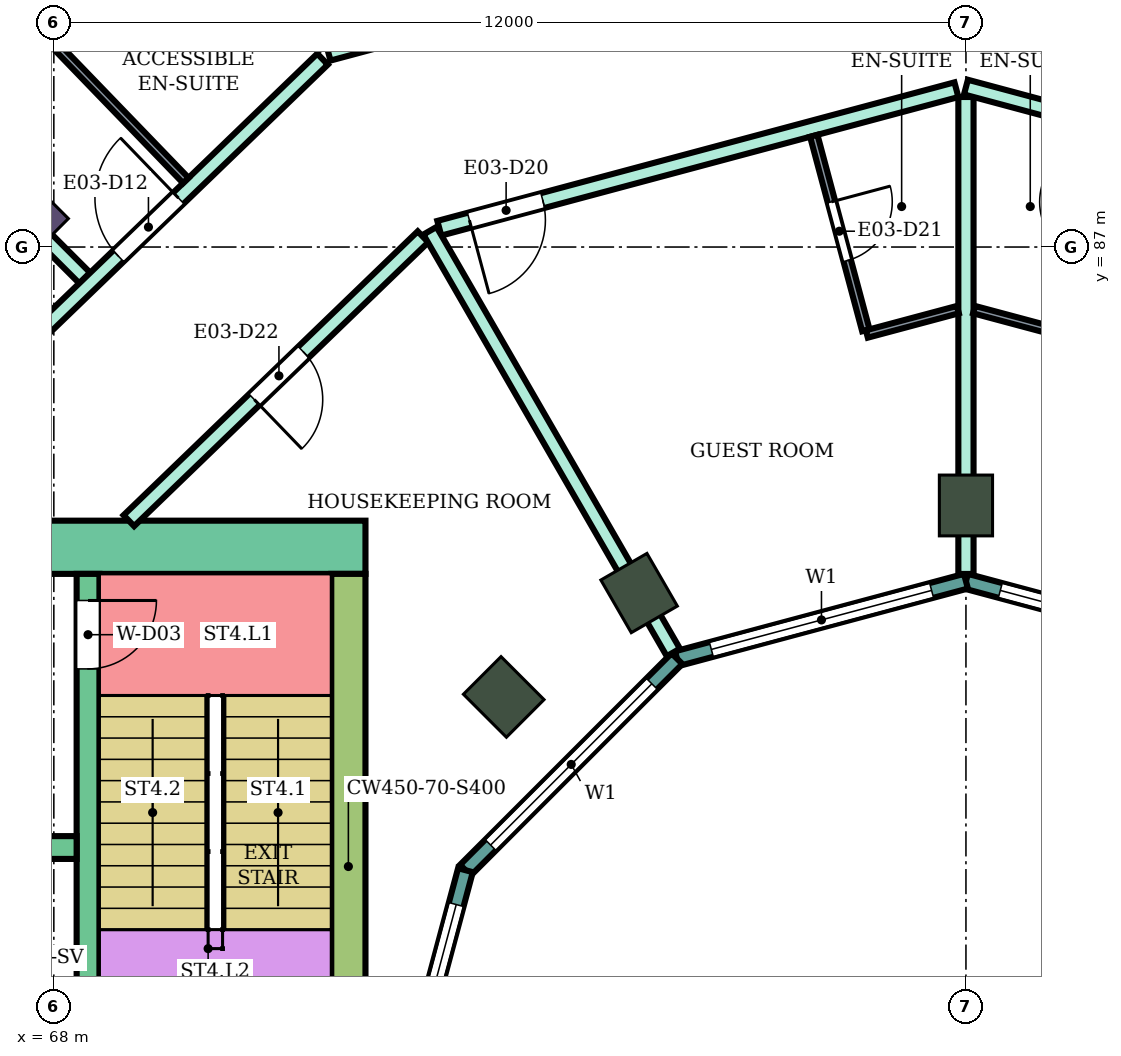
"""IFC4 building model, lengths in metres.
Left out: names, types, materials, properties, quantities, classifications, styles, units other than length and angle.
Written with IfcOpenShell. Run it as: python <this file> out.ifc"""

import sys

from ifc_helpers import new_model, si_unit, direction, frame, frame_2d, origin, origin_2d, place, context, subcontext, project, spatial, rectangle, extrude, element, fill, save


model = new_model("IFC4")
c1 = context("Model", 3, precision=1e-05, world=origin(), true_north=direction((0.0, 1.0)))
c2 = subcontext(c1, "Body", "Model", "MODEL_VIEW")
j1 = project(units=[si_unit("LENGTHUNIT", "METRE"), si_unit("PLANEANGLEUNIT", "RADIAN")], contexts=[c1])
p1 = place(None, origin())
s1 = spatial("IfcSite", under=j1, at=p1, CompositionType="ELEMENT")
p2 = place(p1, origin())
s2 = spatial("IfcBuilding", under=s1, at=p2, CompositionType="ELEMENT")
p3 = place(p2, frame((0.0, 0.0, 145.8)))
s3 = spatial("IfcBuildingStorey", under=s2, at=p3, CompositionType="ELEMENT", Elevation=145.8)
p4 = place(p3, frame((67.555, 87.445, 0.0), z_axis=(0.0, 0.0, 1.0), x_axis=(-0.707106781187, 0.707106781187, 0.0)))
e1 = element("IfcColumn", 1, at=p4, inside=s3, PredefinedType="COLUMN", context=c2, shape_type="SweptSolid", body=[
    extrude(rectangle(XDim=1.0, YDim=0.8, at=origin_2d()), origin(), (0.0, 0.0, 1.0), 3.9),
])
for number, where, z_axis, x_axis in (
    (2, (80.0, 83.6, 0.0), (0.0, 0.0, 1.0), (0.0, 1.0, 0.0)),
    (3, (75.7, 82.448, 0.0), (0.0, 0.0, 1.0), (-0.5, 0.866, 0.0)),
    (4, (73.919, 81.081, 0.0), (0.0, 0.0, 1.0), (-0.707, 0.707, 0.0)),
):
    element("IfcColumn", number, at=place(p3, frame(where, z_axis=z_axis, x_axis=x_axis)), inside=s3, PredefinedType="COLUMN", context=c2, shape_type="SweptSolid", body=[
        extrude(rectangle(XDim=0.8, YDim=0.7, at=origin_2d()), origin(), (0.0, 0.0, 1.0), 3.9),
    ])
p5 = place(p3, frame((72.1, 83.05, 0.0), z_axis=(0.0, 0.0, 1.0), x_axis=(-1.0, 0.0, 0.0)))
e5 = element("IfcWall", 5, at=p5, inside=s3, PredefinedType="SHEAR", context=c2, shape_type="SweptSolid", body=[
    extrude(rectangle(XDim=14.8, YDim=0.7, at=frame_2d((7.4, 0.0))), origin(), (0.0, 0.0, 1.0), 3.5),
])
p6 = place(p5, frame((4.2, 0.0, 0.0)))
e6 = element("IfcOpeningElement", 6, at=p6, cuts=e5, PredefinedType="OPENING", context=c2, shape_type="SweptSolid", body=[
    extrude(rectangle(XDim=2.4, YDim=2.4, at=frame_2d((1.2, 1.2))), frame((0.0, 0.36, 0.0), z_axis=(0.0, -1.0, 0.0), x_axis=(1.0, 0.0, 0.0)), (0.0, 0.0, 1.0), 0.72),
])
p7 = place(p3, frame((71.875, 82.7, 0.0), z_axis=(0.0, 0.0, 1.0), x_axis=(0.0, -1.0, 0.0)))
e7 = element("IfcWall", 7, at=p7, inside=s3, PredefinedType="SHEAR", context=c2, shape_type="SweptSolid", body=[
    extrude(rectangle(XDim=7.7, YDim=0.45, at=frame_2d((3.85, 0.0))), origin(), (0.0, 0.0, 1.0), 3.5),
])
p8 = place(p3, frame((68.45, 82.7, 0.0), z_axis=(0.0, 0.0, 1.0), x_axis=(0.0, -1.0, 0.0)))
e8 = element("IfcWall", 8, at=p8, inside=s3, PredefinedType="SHEAR", context=c2, shape_type="SweptSolid", body=[
    extrude(rectangle(XDim=7.7, YDim=0.3, at=frame_2d((3.85, 0.0))), origin(), (0.0, 0.0, 1.0), 3.5),
])
p9 = place(p8, frame((0.35, 0.0, 0.0)))
e9 = element("IfcOpeningElement", 9, at=p9, cuts=e8, PredefinedType="OPENING", context=c2, shape_type="SweptSolid", body=[
    extrude(rectangle(XDim=0.9, YDim=2.1, at=frame_2d((0.45, 1.05))), frame((0.0, 0.16, 0.0), z_axis=(0.0, -1.0, 0.0), x_axis=(1.0, 0.0, 0.0)), (0.0, 0.0, 1.0), 0.32),
])
p10 = place(p3, frame((68.3, 79.1, 0.0), z_axis=(0.0, 0.0, 1.0), x_axis=(-1.0, 0.0, 0.0)))
e10 = element("IfcWall", 10, at=p10, inside=s3, PredefinedType="SHEAR", context=c2, shape_type="SweptSolid", body=[
    extrude(rectangle(XDim=11.0, YDim=0.3, at=frame_2d((5.5, 0.0))), origin(), (0.0, 0.0, 1.0), 3.5),
])
p11 = place(p10, frame((0.4, 0.0, 0.0)))
e11 = element("IfcOpeningElement", 11, at=p11, cuts=e10, PredefinedType="OPENING", context=c2, shape_type="SweptSolid", body=[
    extrude(rectangle(XDim=1.4, YDim=2.1, at=frame_2d((0.7, 1.05))), frame((0.0, 0.16, 0.0), z_axis=(0.0, -1.0, 0.0), x_axis=(1.0, 0.0, 0.0)), (0.0, 0.0, 1.0), 0.32),
])
p12 = place(p10, frame((5.4, 0.0, 0.0)))
e12 = element("IfcOpeningElement", 12, at=p12, cuts=e10, PredefinedType="OPENING", context=c2, shape_type="SweptSolid", body=[
    extrude(rectangle(XDim=1.4, YDim=2.1, at=frame_2d((0.7, 1.05))), frame((0.0, 0.16, 0.0), z_axis=(0.0, -1.0, 0.0), x_axis=(1.0, 0.0, 0.0)), (0.0, 0.0, 1.0), 0.32),
])
p13 = place(p10, frame((8.1, 0.0, 0.0)))
e13 = element("IfcOpeningElement", 13, at=p13, cuts=e10, PredefinedType="OPENING", context=c2, shape_type="SweptSolid", body=[
    extrude(rectangle(XDim=1.0, YDim=2.1, at=frame_2d((0.5, 1.05))), frame((0.0, 0.16, 0.0), z_axis=(0.0, -1.0, 0.0), x_axis=(1.0, 0.0, 0.0)), (0.0, 0.0, 1.0), 0.32),
])
p14 = place(p3, frame((83.802, 81.585, 0.0), z_axis=(0.0, 0.0, 1.0), x_axis=(-0.965933654434, 0.258789828301, 0.0)))
e14 = element("IfcWall", 14, at=p14, inside=s3, PredefinedType="NOTDEFINED", context=c2, shape_type="SweptSolid", body=[
    extrude(rectangle(XDim=3.936, YDim=0.2, at=frame_2d((1.968, 0.0))), origin(), (0.0, 0.0, 1.0), 3.9),
])
p15 = place(p14, frame((0.468, 0.0, 0.9)))
e15 = element("IfcOpeningElement", 15, at=p15, cuts=e14, PredefinedType="OPENING", context=c2, shape_type="SweptSolid", body=[
    extrude(rectangle(XDim=3.0, YDim=2.3, at=frame_2d((1.5, 1.15))), frame((0.0, 0.11, 0.0), z_axis=(0.0, -1.0, 0.0), x_axis=(1.0, 0.0, 0.0)), (0.0, 0.0, 1.0), 0.22),
])
p16 = place(p3, frame((80.0, 82.604, 0.0), z_axis=(0.0, 0.0, 1.0), x_axis=(-0.965933654434, -0.258789828301, 0.0)))
e16 = element("IfcWall", 16, at=p16, inside=s3, PredefinedType="NOTDEFINED", context=c2, shape_type="SweptSolid", body=[
    extrude(rectangle(XDim=3.936, YDim=0.2, at=frame_2d((1.968, 0.0))), origin(), (0.0, 0.0, 1.0), 3.9),
])
p17 = place(p16, frame((0.468, 0.0, 0.9)))
e17 = element("IfcOpeningElement", 17, at=p17, cuts=e16, PredefinedType="OPENING", context=c2, shape_type="SweptSolid", body=[
    extrude(rectangle(XDim=3.0, YDim=2.3, at=frame_2d((1.5, 1.15))), frame((0.0, 0.11, 0.0), z_axis=(0.0, -1.0, 0.0), x_axis=(1.0, 0.0, 0.0)), (0.0, 0.0, 1.0), 0.22),
])
p18 = place(p3, frame((76.198, 81.585, 0.0), z_axis=(0.0, 0.0, 1.0), x_axis=(-0.707106781187, -0.707106781187, 0.0)))
e18 = element("IfcWall", 18, at=p18, inside=s3, PredefinedType="NOTDEFINED", context=c2, shape_type="SweptSolid", body=[
    extrude(rectangle(XDim=3.936, YDim=0.2, at=frame_2d((1.968, 0.0))), origin(), (0.0, 0.0, 1.0), 3.9),
])
p19 = place(p18, frame((0.468, 0.0, 0.9)))
e19 = element("IfcOpeningElement", 19, at=p19, cuts=e18, PredefinedType="OPENING", context=c2, shape_type="SweptSolid", body=[
    extrude(rectangle(XDim=3.0, YDim=2.3, at=frame_2d((1.5, 1.15))), frame((0.0, 0.11, 0.0), z_axis=(0.0, -1.0, 0.0), x_axis=(1.0, 0.0, 0.0)), (0.0, 0.0, 1.0), 0.22),
])
p20 = place(p3, frame((73.415, 78.802, 0.0), z_axis=(0.0, 0.0, 1.0), x_axis=(-0.258789828301, -0.965933654434, 0.0)))
e20 = element("IfcWall", 20, at=p20, inside=s3, PredefinedType="NOTDEFINED", context=c2, shape_type="SweptSolid", body=[
    extrude(rectangle(XDim=3.936, YDim=0.2, at=frame_2d((1.968, 0.0))), origin(), (0.0, 0.0, 1.0), 3.9),
])
p21 = place(p20, frame((0.468, 0.0, 0.9)))
e21 = element("IfcOpeningElement", 21, at=p21, cuts=e20, PredefinedType="OPENING", context=c2, shape_type="SweptSolid", body=[
    extrude(rectangle(XDim=3.0, YDim=2.3, at=frame_2d((1.5, 1.15))), frame((0.0, 0.11, 0.0), z_axis=(0.0, -1.0, 0.0), x_axis=(1.0, 0.0, 0.0)), (0.0, 0.0, 1.0), 0.22),
])
p22 = place(p3, frame((63.596, 91.406, 0.0), z_axis=(0.0, 0.0, 1.0), x_axis=(0.706963264491, -0.707250268759, 0.0)))
e22 = element("IfcWall", 22, at=p22, inside=s3, PredefinedType="PARTITIONING", context=c2, shape_type="SweptSolid", body=[
    extrude(rectangle(XDim=6.805, YDim=0.2, at=frame_2d((3.403, 0.0))), origin(), (0.0, 0.0, 1.0), 3.45),
])
p23 = place(p3, frame((66.797, 84.9, 0.0), z_axis=(0.0, 0.0, 1.0), x_axis=(0.719692092412, 0.694293376116, 0.0)))
e23 = element("IfcWall", 23, at=p23, inside=s3, PredefinedType="PARTITIONING", context=c2, shape_type="SweptSolid", body=[
    extrude(rectangle(XDim=6.584, YDim=0.2, at=frame_2d((3.292, 0.0))), origin(), (0.0, 0.0, 1.0), 3.45),
])
p24 = place(p23, frame((2.852, 0.0, 0.0)))
e24 = element("IfcOpeningElement", 24, at=p24, cuts=e23, PredefinedType="OPENING", context=c2, shape_type="SweptSolid", body=[
    extrude(rectangle(XDim=1.1, YDim=2.1, at=frame_2d((0.55, 1.05))), frame((0.0, 0.11, 0.0), z_axis=(0.0, -1.0, 0.0), x_axis=(1.0, 0.0, 0.0)), (0.0, 0.0, 1.0), 0.22),
])
p25 = place(p3, frame((68.987, 83.4, 0.0), z_axis=(0.0, 0.0, 1.0), x_axis=(0.719547721855, 0.694442996922, 0.0)))
e25 = element("IfcWall", 25, at=p25, inside=s3, PredefinedType="PARTITIONING", context=c2, shape_type="SweptSolid", body=[
    extrude(rectangle(XDim=5.378, YDim=0.2, at=frame_2d((2.689, 0.0))), origin(), (0.0, 0.0, 1.0), 3.45),
])
p26 = place(p25, frame((2.294, 0.0, 0.0)))
e26 = element("IfcOpeningElement", 26, at=p26, cuts=e25, PredefinedType="OPENING", context=c2, shape_type="SweptSolid", body=[
    extrude(rectangle(XDim=0.9, YDim=2.1, at=frame_2d((0.45, 1.05))), frame((0.0, 0.11, 0.0), z_axis=(0.0, -1.0, 0.0), x_axis=(1.0, 0.0, 0.0)), (0.0, 0.0, 1.0), 0.22),
])
p27 = place(p3, frame((71.614, 89.55, 0.0), z_axis=(0.0, 0.0, 1.0), x_axis=(0.965982156828, 0.258608725086, 0.0)))
e27 = element("IfcWall", 27, at=p27, inside=s3, PredefinedType="PARTITIONING", context=c2, shape_type="SweptSolid", body=[
    extrude(rectangle(XDim=8.592, YDim=0.2, at=frame_2d((4.296, 0.0))), origin(), (0.0, 0.0, 1.0), 3.45),
])
p28 = place(p27, frame((4.865, 0.0, 0.0)))
e28 = element("IfcOpeningElement", 28, at=p28, cuts=e27, PredefinedType="OPENING", context=c2, shape_type="SweptSolid", body=[
    extrude(rectangle(XDim=1.0, YDim=2.1, at=frame_2d((0.5, 1.05))), frame((0.0, 0.11, 0.0), z_axis=(0.0, -1.0, 0.0), x_axis=(1.0, 0.0, 0.0)), (0.0, 0.0, 1.0), 0.22),
])
p29 = place(p27, frame((2.804, 0.0, 0.0)))
e29 = element("IfcOpeningElement", 29, at=p29, cuts=e27, PredefinedType="OPENING", context=c2, shape_type="SweptSolid", body=[
    extrude(rectangle(XDim=1.0, YDim=2.1, at=frame_2d((0.5, 1.05))), frame((0.0, 0.11, 0.0), z_axis=(0.0, -1.0, 0.0), x_axis=(1.0, 0.0, 0.0)), (0.0, 0.0, 1.0), 0.22),
])
p30 = place(p3, frame((73.071, 87.247, 0.0), z_axis=(0.0, 0.0, 1.0), x_axis=(0.965931651205, 0.258797305243, 0.0)))
e30 = element("IfcWall", 30, at=p30, inside=s3, PredefinedType="PARTITIONING", context=c2, shape_type="SweptSolid", body=[
    extrude(rectangle(XDim=7.043, YDim=0.2, at=frame_2d((3.521, 0.0))), origin(), (0.0, 0.0, 1.0), 3.45),
])
p31 = place(p30, frame((0.41, 0.0, 0.0)))
e31 = element("IfcOpeningElement", 31, at=p31, cuts=e30, PredefinedType="OPENING", context=c2, shape_type="SweptSolid", body=[
    extrude(rectangle(XDim=1.0, YDim=2.1, at=frame_2d((0.5, 1.05))), frame((0.0, 0.11, 0.0), z_axis=(0.0, -1.0, 0.0), x_axis=(1.0, 0.0, 0.0)), (0.0, 0.0, 1.0), 0.22),
])
p32 = place(p3, frame((72.948, 87.214, 0.0), z_axis=(0.0, 0.0, 1.0), x_axis=(0.499898430755, -0.866084036875, 0.0)))
e32 = element("IfcWall", 32, at=p32, inside=s3, PredefinedType="PARTITIONING", context=c2, shape_type="SweptSolid", body=[
    extrude(rectangle(XDim=6.405, YDim=0.2, at=frame_2d((3.203, 0.0))), origin(), (0.0, 0.0, 1.0), 3.45),
])
p33 = place(p3, frame((80.0, 82.699, 0.0), z_axis=(0.0, 0.0, 1.0), x_axis=(0.0, 1.0, 0.0)))
e33 = element("IfcWall", 33, at=p33, inside=s3, PredefinedType="PARTITIONING", context=c2, shape_type="SweptSolid", body=[
    extrude(rectangle(XDim=6.275, YDim=0.2, at=frame_2d((3.138, 0.0))), origin(), (0.0, 0.0, 1.0), 3.45),
])
p34 = place(p3, frame((80.0, 89.104, 0.0), z_axis=(0.0, 0.0, 1.0), x_axis=(0.965854247166, -0.25908603442, 0.0)))
e34 = element("IfcWall", 34, at=p34, inside=s3, PredefinedType="PARTITIONING", context=c2, shape_type="SweptSolid", body=[
    extrude(rectangle(XDim=7.183, YDim=0.2, at=frame_2d((3.592, 0.0))), origin(), (0.0, 0.0, 1.0), 3.45),
])
p35 = place(p34, frame((5.763, 0.0, 0.0)))
e35 = element("IfcOpeningElement", 35, at=p35, cuts=e34, PredefinedType="OPENING", context=c2, shape_type="SweptSolid", body=[
    extrude(rectangle(XDim=1.0, YDim=2.1, at=frame_2d((0.5, 1.05))), frame((0.0, 0.11, 0.0), z_axis=(0.0, -1.0, 0.0), x_axis=(1.0, 0.0, 0.0)), (0.0, 0.0, 1.0), 0.22),
])
p36 = place(p3, frame((80.0, 91.796, 0.0), z_axis=(0.0, 0.0, 1.0), x_axis=(0.965891796243, -0.258946013582, 0.0)))
e36 = element("IfcWall", 36, at=p36, inside=s3, PredefinedType="PARTITIONING", context=c2, shape_type="SweptSolid", body=[
    extrude(rectangle(XDim=8.642, YDim=0.2, at=frame_2d((4.321, 0.0))), origin(), (0.0, 0.0, 1.0), 3.45),
])
p37 = place(p36, frame((4.877, 0.0, 0.0)))
e37 = element("IfcOpeningElement", 37, at=p37, cuts=e36, PredefinedType="OPENING", context=c2, shape_type="SweptSolid", body=[
    extrude(rectangle(XDim=1.0, YDim=2.1, at=frame_2d((0.5, 1.05))), frame((0.0, 0.11, 0.0), z_axis=(0.0, -1.0, 0.0), x_axis=(1.0, 0.0, 0.0)), (0.0, 0.0, 1.0), 0.22),
])
p38 = place(p36, frame((2.817, 0.0, 0.0)))
e38 = element("IfcOpeningElement", 38, at=p38, cuts=e36, PredefinedType="OPENING", context=c2, shape_type="SweptSolid", body=[
    extrude(rectangle(XDim=1.0, YDim=2.1, at=frame_2d((0.5, 1.05))), frame((0.0, 0.11, 0.0), z_axis=(0.0, -1.0, 0.0), x_axis=(1.0, 0.0, 0.0)), (0.0, 0.0, 1.0), 0.22),
])
p39 = place(p3, frame((67.758, 89.926, 0.0), z_axis=(0.0, 0.0, 1.0), x_axis=(0.694485934895, -0.719506279495, 0.0)))
e39 = element("IfcWall", 39, at=p39, inside=s3, PredefinedType="PARTITIONING", context=c2, shape_type="SweptSolid", body=[
    extrude(rectangle(XDim=2.849, YDim=0.1, at=frame_2d((1.425, 0.0))), origin(), (0.0, 0.0, 1.0), 3.45),
])
p40 = place(p3, frame((77.998, 88.463, 0.0), z_axis=(0.0, 0.0, 1.0), x_axis=(0.258677737588, -0.965963678446, 0.0)))
e40 = element("IfcWall", 40, at=p40, inside=s3, PredefinedType="PARTITIONING", context=c2, shape_type="SweptSolid", body=[
    extrude(rectangle(XDim=2.649, YDim=0.1, at=frame_2d((1.325, 0.0))), origin(), (0.0, 0.0, 1.0), 3.45),
])
p41 = place(p40, frame((0.9, 0.0, 0.0)))
e41 = element("IfcOpeningElement", 41, at=p41, cuts=e40, PredefinedType="OPENING", context=c2, shape_type="SweptSolid", body=[
    extrude(rectangle(XDim=0.8, YDim=2.1, at=frame_2d((0.4, 1.05))), frame((0.0, 0.06, 0.0), z_axis=(0.0, -1.0, 0.0), x_axis=(1.0, 0.0, 0.0)), (0.0, 0.0, 1.0), 0.12),
])
p42 = place(p3, frame((78.696, 85.856, 0.0), z_axis=(0.0, 0.0, 1.0), x_axis=(0.966002513606, 0.258532674351, 0.0)))
e42 = element("IfcWall", 42, at=p42, inside=s3, PredefinedType="PARTITIONING", context=c2, shape_type="SweptSolid", body=[
    extrude(rectangle(XDim=1.24, YDim=0.1, at=frame_2d((0.62, 0.0))), origin(), (0.0, 0.0, 1.0), 3.45),
])
p43 = place(p3, frame((80.106, 86.177, 0.0), z_axis=(0.0, 0.0, 1.0), x_axis=(0.966002973184, -0.258530957139, 0.0)))
e43 = element("IfcWall", 43, at=p43, inside=s3, PredefinedType="PARTITIONING", context=c2, shape_type="SweptSolid", body=[
    extrude(rectangle(XDim=1.19, YDim=0.1, at=frame_2d((0.595, 0.0))), origin(), (0.0, 0.0, 1.0), 3.45),
])
p44 = place(p15, origin())
e44 = element("IfcWindow", 44, at=p44, inside=s3, PartitioningType="SINGLE_PANEL", PredefinedType="WINDOW", context=c2, shape_type="SweptSolid", body=[
    extrude(rectangle(XDim=3.0, YDim=2.3, at=frame_2d((1.5, 1.15))), frame((0.0, 0.03, 0.0), z_axis=(0.0, -1.0, 0.0), x_axis=(1.0, 0.0, 0.0)), (0.0, 0.0, 1.0), 0.06),
])
fill(e15, e44)
p45 = place(p17, origin())
e45 = element("IfcWindow", 45, at=p45, inside=s3, PartitioningType="SINGLE_PANEL", PredefinedType="WINDOW", context=c2, shape_type="SweptSolid", body=[
    extrude(rectangle(XDim=3.0, YDim=2.3, at=frame_2d((1.5, 1.15))), frame((0.0, 0.03, 0.0), z_axis=(0.0, -1.0, 0.0), x_axis=(1.0, 0.0, 0.0)), (0.0, 0.0, 1.0), 0.06),
])
fill(e17, e45)
p46 = place(p19, origin())
e46 = element("IfcWindow", 46, at=p46, inside=s3, PartitioningType="SINGLE_PANEL", PredefinedType="WINDOW", context=c2, shape_type="SweptSolid", body=[
    extrude(rectangle(XDim=3.0, YDim=2.3, at=frame_2d((1.5, 1.15))), frame((0.0, 0.03, 0.0), z_axis=(0.0, -1.0, 0.0), x_axis=(1.0, 0.0, 0.0)), (0.0, 0.0, 1.0), 0.06),
])
fill(e19, e46)
p47 = place(p21, origin())
e47 = element("IfcWindow", 47, at=p47, inside=s3, PartitioningType="SINGLE_PANEL", PredefinedType="WINDOW", context=c2, shape_type="SweptSolid", body=[
    extrude(rectangle(XDim=3.0, YDim=2.3, at=frame_2d((1.5, 1.15))), frame((0.0, 0.03, 0.0), z_axis=(0.0, -1.0, 0.0), x_axis=(1.0, 0.0, 0.0)), (0.0, 0.0, 1.0), 0.06),
])
fill(e21, e47)
p48 = place(p24, origin())
e48 = element("IfcDoor", 48, at=p48, inside=s3, OperationType="SINGLE_SWING_RIGHT", PredefinedType="DOOR", context=c2, shape_type="SweptSolid", body=[
    extrude(rectangle(XDim=1.1, YDim=2.1, at=frame_2d((0.55, 1.05))), frame((0.0, 0.025, 0.0), z_axis=(0.0, -1.0, 0.0), x_axis=(1.0, 0.0, 0.0)), (0.0, 0.0, 1.0), 0.05),
])
fill(e24, e48)
p49 = place(p31, frame((1.0, 0.0, 0.0), z_axis=(0.0, 0.0, 1.0), x_axis=(-1.0, 0.0, 0.0)))
e49 = element("IfcDoor", 49, at=p49, inside=s3, OperationType="SINGLE_SWING_RIGHT", PredefinedType="DOOR", context=c2, shape_type="SweptSolid", body=[
    extrude(rectangle(XDim=1.0, YDim=2.1, at=frame_2d((0.5, 1.05))), frame((0.0, 0.025, 0.0), z_axis=(0.0, -1.0, 0.0), x_axis=(1.0, 0.0, 0.0)), (0.0, 0.0, 1.0), 0.05),
])
fill(e31, e49)
p50 = place(p41, origin())
e50 = element("IfcDoor", 50, at=p50, inside=s3, OperationType="SINGLE_SWING_LEFT", PredefinedType="DOOR", context=c2, shape_type="SweptSolid", body=[
    extrude(rectangle(XDim=0.8, YDim=2.1, at=frame_2d((0.4, 1.05))), frame((0.0, 0.025, 0.0), z_axis=(0.0, -1.0, 0.0), x_axis=(1.0, 0.0, 0.0)), (0.0, 0.0, 1.0), 0.05),
])
fill(e41, e50)
p51 = place(p26, frame((0.9, 0.0, 0.0), z_axis=(0.0, 0.0, 1.0), x_axis=(-1.0, 0.0, 0.0)))
e51 = element("IfcDoor", 51, at=p51, inside=s3, OperationType="SINGLE_SWING_RIGHT", PredefinedType="DOOR", context=c2, shape_type="SweptSolid", body=[
    extrude(rectangle(XDim=0.9, YDim=2.1, at=frame_2d((0.45, 1.05))), frame((0.0, 0.025, 0.0), z_axis=(0.0, -1.0, 0.0), x_axis=(1.0, 0.0, 0.0)), (0.0, 0.0, 1.0), 0.05),
])
fill(e26, e51)
p52 = place(p9, origin())
e52 = element("IfcDoor", 52, at=p52, inside=s3, OperationType="SINGLE_SWING_LEFT", PredefinedType="DOOR", context=c2, shape_type="SweptSolid", body=[
    extrude(rectangle(XDim=0.9, YDim=2.1, at=frame_2d((0.45, 1.05))), frame((0.0, 0.025, 0.0), z_axis=(0.0, -1.0, 0.0), x_axis=(1.0, 0.0, 0.0)), (0.0, 0.0, 1.0), 0.05),
])
fill(e9, e52)
save(model, sys.argv[1])
